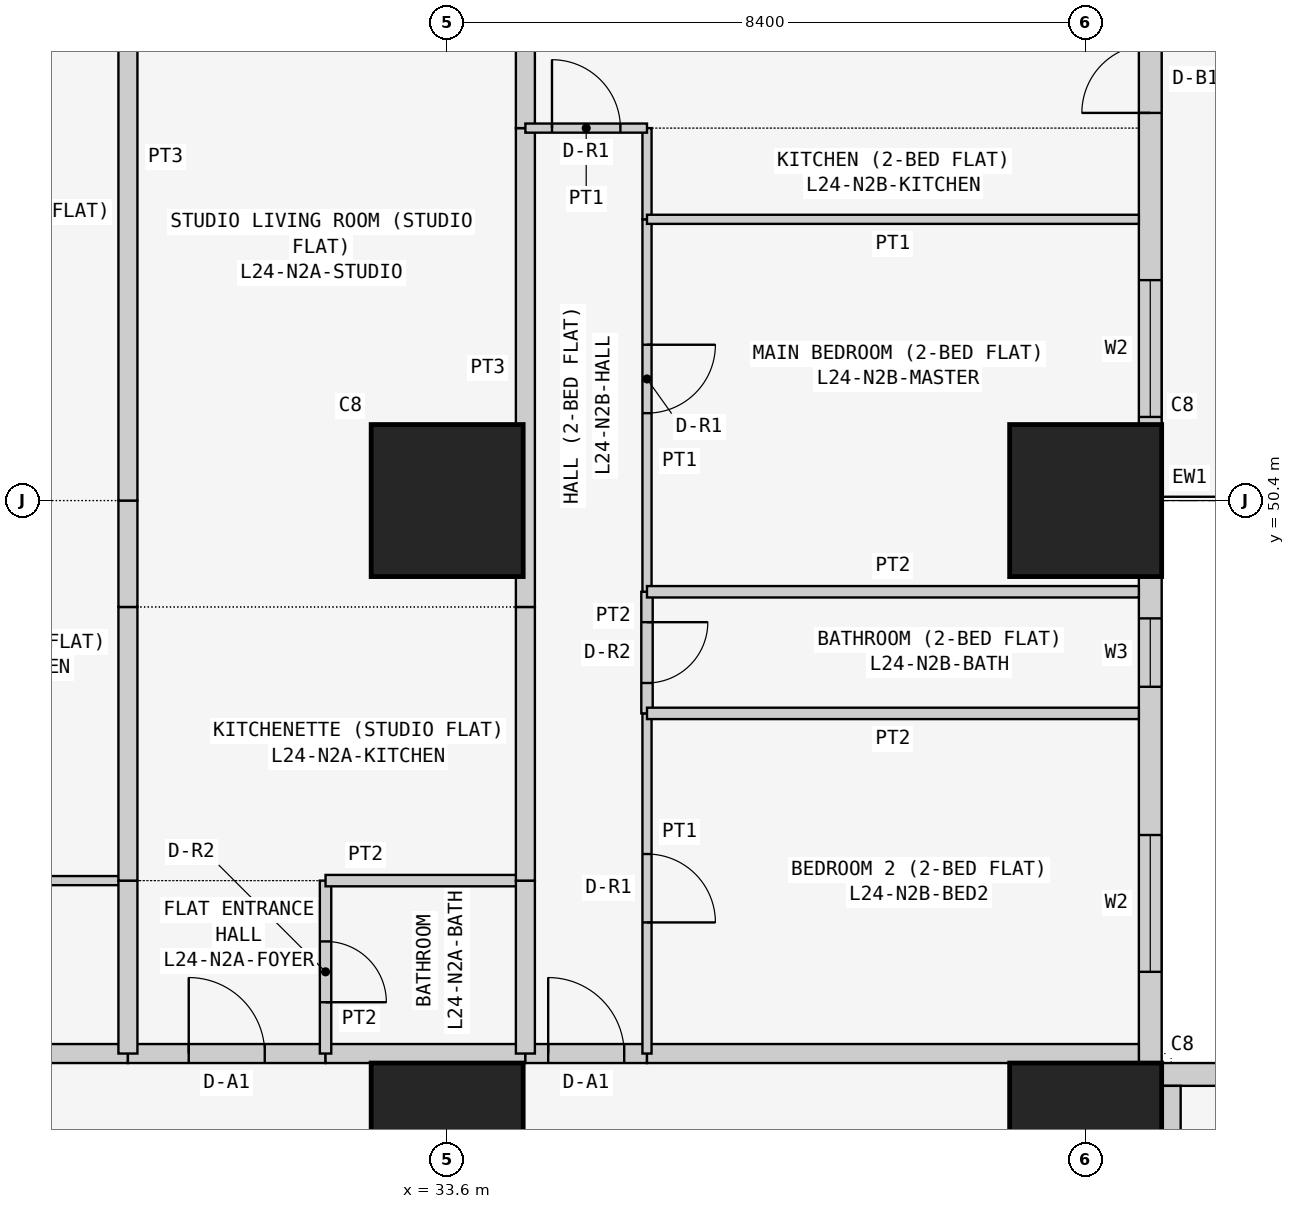
"""IFC4 building model, lengths in metres.
Left out: names, types, materials, properties, quantities, classifications, styles, units other than length and angle.
Written with IfcOpenShell. Run it as: python <this file> out.ifc"""

import sys

from ifc_helpers import new_model, si_unit, direction, frame, frame_2d, origin, origin_2d, place, context, subcontext, project, spatial, rectangle, extrude, element, fill, save


model = new_model("IFC4")
c1 = context("Model", 3, precision=1e-05, world=origin(), true_north=direction((0.0, 1.0)))
c2 = subcontext(c1, "Body", "Model", "MODEL_VIEW")
j1 = project(units=[si_unit("LENGTHUNIT", "METRE"), si_unit("PLANEANGLEUNIT", "RADIAN")], contexts=[c1])
p1 = place(None, origin())
s1 = spatial("IfcSite", under=j1, at=p1, CompositionType="ELEMENT")
p2 = place(p1, origin())
s2 = spatial("IfcBuilding", under=s1, at=p2, CompositionType="ELEMENT")
p3 = place(p2, frame((0.0, 0.0, 95.7)))
s3 = spatial("IfcBuildingStorey", under=s2, at=p3, CompositionType="ELEMENT", Elevation=95.7)
for number, where, z_axis, x_axis in (
    (1, (33.6, 42.0, 0.0), (0.0, 0.0, 1.0), (1.0, 0.0, 0.0)),
    (2, (33.6, 50.4, 0.0), (0.0, 0.0, 1.0), (1.0, 0.0, 0.0)),
    (3, (42.0, 42.0, 0.0), (0.0, 0.0, 1.0), (1.0, 0.0, 0.0)),
    (4, (42.0, 50.4, 0.0), (0.0, 0.0, 1.0), (1.0, 0.0, 0.0)),
):
    element("IfcColumn", number, at=place(p3, frame(where, z_axis=z_axis, x_axis=x_axis)), inside=s3, PredefinedType="COLUMN", context=c2, shape_type="SweptSolid", body=[
        extrude(rectangle(XDim=2.0, YDim=2.0, at=origin_2d()), origin(), (0.0, 0.0, 1.0), 3.6),
    ])
p4 = place(p3, frame((58.4, 42.85, 0.0), z_axis=(0.0, 0.0, 1.0), x_axis=(-1.0, 0.0, 0.0)))
e5 = element("IfcWall", 5, at=p4, inside=s3, PredefinedType="SOLIDWALL", context=c2, shape_type="SweptSolid", body=[
    extrude(rectangle(XDim=15.7, YDim=0.3, at=frame_2d((7.85, 0.0))), origin(), (0.0, 0.0, 1.0), 3.45),
])
p5 = place(p4, frame((12.4, 0.0, 0.9)))
e6 = element("IfcOpeningElement", 6, at=p5, cuts=e5, PredefinedType="OPENING", context=c2, shape_type="SweptSolid", body=[
    extrude(rectangle(XDim=1.8, YDim=1.5, at=frame_2d((0.9, 0.75))), frame((0.0, 0.16, 0.0), z_axis=(0.0, -1.0, 0.0), x_axis=(1.0, 0.0, 0.0)), (0.0, 0.0, 1.0), 0.32),
])
p6 = place(p4, frame((9.55, 0.0, 1.5)))
e7 = element("IfcOpeningElement", 7, at=p6, cuts=e5, PredefinedType="OPENING", context=c2, shape_type="SweptSolid", body=[
    extrude(rectangle(XDim=0.9, YDim=0.7, at=frame_2d((0.45, 0.35))), frame((0.0, 0.16, 0.0), z_axis=(0.0, -1.0, 0.0), x_axis=(1.0, 0.0, 0.0)), (0.0, 0.0, 1.0), 0.32),
])
p7 = place(p4, frame((5.1, 0.0, 0.9)))
e8 = element("IfcOpeningElement", 8, at=p7, cuts=e5, PredefinedType="OPENING", context=c2, shape_type="SweptSolid", body=[
    extrude(rectangle(XDim=1.8, YDim=1.5, at=frame_2d((0.9, 0.75))), frame((0.0, 0.16, 0.0), z_axis=(0.0, -1.0, 0.0), x_axis=(1.0, 0.0, 0.0)), (0.0, 0.0, 1.0), 0.32),
])
p8 = place(p4, frame((2.0, 0.0, 0.0)))
e9 = element("IfcOpeningElement", 9, at=p8, cuts=e5, PredefinedType="OPENING", context=c2, shape_type="SweptSolid", body=[
    extrude(rectangle(XDim=0.9, YDim=2.4, at=frame_2d((0.45, 1.2))), frame((0.0, 0.16, 0.0), z_axis=(0.0, -1.0, 0.0), x_axis=(1.0, 0.0, 0.0)), (0.0, 0.0, 1.0), 0.32),
])
p9 = place(p4, frame((0.7, 0.0, 0.9)))
e10 = element("IfcOpeningElement", 10, at=p9, cuts=e5, PredefinedType="OPENING", context=c2, shape_type="SweptSolid", body=[
    extrude(rectangle(XDim=1.2, YDim=1.5, at=frame_2d((0.6, 0.75))), frame((0.0, 0.16, 0.0), z_axis=(0.0, -1.0, 0.0), x_axis=(1.0, 0.0, 0.0)), (0.0, 0.0, 1.0), 0.32),
])
p10 = place(p3, frame((42.85, 43.0, 0.0), z_axis=(0.0, 0.0, 1.0), x_axis=(0.0, 1.0, 0.0)))
e11 = element("IfcWall", 11, at=p10, inside=s3, PredefinedType="SOLIDWALL", context=c2, shape_type="SweptSolid", body=[
    extrude(rectangle(XDim=15.4, YDim=0.3, at=frame_2d((7.7, 0.0))), origin(), (0.0, 0.0, 1.0), 3.45),
])
p11 = place(p10, frame((1.2, 0.0, 0.9)))
e12 = element("IfcOpeningElement", 12, at=p11, cuts=e11, PredefinedType="OPENING", context=c2, shape_type="SweptSolid", body=[
    extrude(rectangle(XDim=1.8, YDim=1.5, at=frame_2d((0.9, 0.75))), frame((0.0, 0.16, 0.0), z_axis=(0.0, -1.0, 0.0), x_axis=(1.0, 0.0, 0.0)), (0.0, 0.0, 1.0), 0.32),
])
p12 = place(p10, frame((4.95, 0.0, 1.5)))
e13 = element("IfcOpeningElement", 13, at=p12, cuts=e11, PredefinedType="OPENING", context=c2, shape_type="SweptSolid", body=[
    extrude(rectangle(XDim=0.9, YDim=0.7, at=frame_2d((0.45, 0.35))), frame((0.0, 0.16, 0.0), z_axis=(0.0, -1.0, 0.0), x_axis=(1.0, 0.0, 0.0)), (0.0, 0.0, 1.0), 0.32),
])
p13 = place(p10, frame((8.5, 0.0, 0.9)))
e14 = element("IfcOpeningElement", 14, at=p13, cuts=e11, PredefinedType="OPENING", context=c2, shape_type="SweptSolid", body=[
    extrude(rectangle(XDim=1.8, YDim=1.5, at=frame_2d((0.9, 0.75))), frame((0.0, 0.16, 0.0), z_axis=(0.0, -1.0, 0.0), x_axis=(1.0, 0.0, 0.0)), (0.0, 0.0, 1.0), 0.32),
])
p14 = place(p10, frame((12.5, 0.0, 0.0)))
e15 = element("IfcOpeningElement", 15, at=p14, cuts=e11, PredefinedType="OPENING", context=c2, shape_type="SweptSolid", body=[
    extrude(rectangle(XDim=0.9, YDim=2.4, at=frame_2d((0.45, 1.2))), frame((0.0, 0.16, 0.0), z_axis=(0.0, -1.0, 0.0), x_axis=(1.0, 0.0, 0.0)), (0.0, 0.0, 1.0), 0.32),
])
p15 = place(p10, frame((13.5, 0.0, 0.9)))
e16 = element("IfcOpeningElement", 16, at=p15, cuts=e11, PredefinedType="OPENING", context=c2, shape_type="SweptSolid", body=[
    extrude(rectangle(XDim=1.2, YDim=1.5, at=frame_2d((0.6, 0.75))), frame((0.0, 0.16, 0.0), z_axis=(0.0, -1.0, 0.0), x_axis=(1.0, 0.0, 0.0)), (0.0, 0.0, 1.0), 0.32),
])
p16 = place(p3, frame((22.3, 43.125, 0.0), z_axis=(0.0, 0.0, 1.0), x_axis=(1.0, 0.0, 0.0)))
e17 = element("IfcWall", 17, at=p16, inside=s3, PredefinedType="PARTITIONING", context=c2, shape_type="SweptSolid", body=[
    extrude(rectangle(XDim=7.1, YDim=0.25, at=frame_2d((3.55, 0.0))), origin(), (0.0, 0.0, 1.0), 3.45),
])
p17 = place(p16, frame((4.05, 0.0, 0.0)))
e18 = element("IfcOpeningElement", 18, at=p17, cuts=e17, PredefinedType="OPENING", context=c2, shape_type="SweptSolid", body=[
    extrude(rectangle(XDim=1.0, YDim=2.1, at=frame_2d((0.5, 1.05))), frame((0.0, 0.135, 0.0), z_axis=(0.0, -1.0, 0.0), x_axis=(1.0, 0.0, 0.0)), (0.0, 0.0, 1.0), 0.27),
])
p18 = place(p3, frame((29.4, 43.125, 0.0), z_axis=(0.0, 0.0, 1.0), x_axis=(1.0, 0.0, 0.0)))
e19 = element("IfcWall", 19, at=p18, inside=s3, PredefinedType="PARTITIONING", context=c2, shape_type="SweptSolid", body=[
    extrude(rectangle(XDim=2.6, YDim=0.25, at=frame_2d((1.3, 0.0))), origin(), (0.0, 0.0, 1.0), 3.45),
])
p19 = place(p18, frame((0.8, 0.0, 0.0)))
e20 = element("IfcOpeningElement", 20, at=p19, cuts=e19, PredefinedType="OPENING", context=c2, shape_type="SweptSolid", body=[
    extrude(rectangle(XDim=1.0, YDim=2.1, at=frame_2d((0.5, 1.05))), frame((0.0, 0.135, 0.0), z_axis=(0.0, -1.0, 0.0), x_axis=(1.0, 0.0, 0.0)), (0.0, 0.0, 1.0), 0.27),
])
p20 = place(p3, frame((32.0, 43.125, 0.0), z_axis=(0.0, 0.0, 1.0), x_axis=(1.0, 0.0, 0.0)))
e21 = element("IfcWall", 21, at=p20, inside=s3, PredefinedType="PARTITIONING", context=c2, shape_type="SweptSolid", body=[
    extrude(rectangle(XDim=2.629, YDim=0.25, at=frame_2d((1.314, 0.0))), origin(), (0.0, 0.0, 1.0), 3.45),
])
p21 = place(p3, frame((34.629, 43.125, 0.0), z_axis=(0.0, 0.0, 1.0), x_axis=(1.0, 0.0, 0.0)))
e22 = element("IfcWall", 22, at=p21, inside=s3, PredefinedType="PARTITIONING", context=c2, shape_type="SweptSolid", body=[
    extrude(rectangle(XDim=1.6, YDim=0.25, at=frame_2d((0.8, 0.0))), origin(), (0.0, 0.0, 1.0), 3.45),
])
p22 = place(p21, frame((0.3, 0.0, 0.0)))
e23 = element("IfcOpeningElement", 23, at=p22, cuts=e22, PredefinedType="OPENING", context=c2, shape_type="SweptSolid", body=[
    extrude(rectangle(XDim=1.0, YDim=2.1, at=frame_2d((0.5, 1.05))), frame((0.0, 0.135, 0.0), z_axis=(0.0, -1.0, 0.0), x_axis=(1.0, 0.0, 0.0)), (0.0, 0.0, 1.0), 0.27),
])
p23 = place(p3, frame((36.229, 43.125, 0.0), z_axis=(0.0, 0.0, 1.0), x_axis=(1.0, 0.0, 0.0)))
e24 = element("IfcWall", 24, at=p23, inside=s3, PredefinedType="PARTITIONING", context=c2, shape_type="SweptSolid", body=[
    extrude(rectangle(XDim=6.471, YDim=0.25, at=frame_2d((3.235, 0.0))), origin(), (0.0, 0.0, 1.0), 3.45),
])
p24 = place(p3, frame((43.125, 42.7, 0.0), z_axis=(0.0, 0.0, 1.0), x_axis=(0.0, -1.0, 0.0)))
e25 = element("IfcWall", 25, at=p24, inside=s3, PredefinedType="PARTITIONING", context=c2, shape_type="SweptSolid", body=[
    extrude(rectangle(XDim=6.871, YDim=0.25, at=frame_2d((3.436, 0.0))), origin(), (0.0, 0.0, 1.0), 3.45),
])
p25 = place(p3, frame((29.4, 45.4, 0.0), z_axis=(0.0, 0.0, 1.0), x_axis=(-1.0, 0.0, 0.0)))
e26 = element("IfcWall", 26, at=p25, inside=s3, PredefinedType="PARTITIONING", context=c2, shape_type="SweptSolid", body=[
    extrude(rectangle(XDim=4.0, YDim=0.12, at=frame_2d((2.0, 0.0))), origin(), (0.0, 0.0, 1.0), 3.45),
])
p26 = place(p25, frame((1.05, 0.0, 0.0)))
e27 = element("IfcOpeningElement", 27, at=p26, cuts=e26, PredefinedType="OPENING", context=c2, shape_type="SweptSolid", body=[
    extrude(rectangle(XDim=0.9, YDim=2.1, at=frame_2d((0.45, 1.05))), frame((0.0, 0.07, 0.0), z_axis=(0.0, -1.0, 0.0), x_axis=(1.0, 0.0, 0.0)), (0.0, 0.0, 1.0), 0.14),
])
p27 = place(p3, frame((29.4, 43.125, 0.0), z_axis=(0.0, 0.0, 1.0), x_axis=(0.0, 1.0, 0.0)))
e28 = element("IfcWall", 28, at=p27, inside=s3, PredefinedType="PARTITIONING", context=c2, shape_type="SweptSolid", body=[
    extrude(rectangle(XDim=2.275, YDim=0.25, at=frame_2d((1.137, 0.0))), origin(), (0.0, 0.0, 1.0), 2.848),
])
p28 = place(p3, frame((29.4, 49.0, 0.0), z_axis=(0.0, 0.0, 1.0), x_axis=(0.0, -1.0, 0.0)))
e29 = element("IfcWall", 29, at=p28, inside=s3, PredefinedType="PARTITIONING", context=c2, shape_type="SweptSolid", body=[
    extrude(rectangle(XDim=3.6, YDim=0.25, at=frame_2d((1.8, 0.0))), origin(), (0.0, 0.0, 1.0), 2.848),
])
p29 = place(p3, frame((29.4, 50.4, 0.0), z_axis=(0.0, 0.0, 1.0), x_axis=(0.0, -1.0, 0.0)))
e30 = element("IfcWall", 30, at=p29, inside=s3, PredefinedType="PARTITIONING", context=c2, shape_type="SweptSolid", body=[
    extrude(rectangle(XDim=1.4, YDim=0.25, at=frame_2d((0.7, 0.0))), origin(), (0.0, 0.0, 1.0), 2.848),
])
p30 = place(p3, frame((29.4, 59.45, 0.0), z_axis=(0.0, 0.0, 1.0), x_axis=(0.0, -1.0, 0.0)))
e31 = element("IfcWall", 31, at=p30, inside=s3, PredefinedType="PARTITIONING", context=c2, shape_type="SweptSolid", body=[
    extrude(rectangle(XDim=9.05, YDim=0.25, at=frame_2d((4.525, 0.0))), origin(), (0.0, 0.0, 1.0), 2.848),
])
p31 = place(p3, frame((32.0, 45.4, 0.0), z_axis=(0.0, 0.0, 1.0), x_axis=(0.0, -1.0, 0.0)))
e32 = element("IfcWall", 32, at=p31, inside=s3, PredefinedType="PARTITIONING", context=c2, shape_type="SweptSolid", body=[
    extrude(rectangle(XDim=2.275, YDim=0.15, at=frame_2d((1.137, 0.0))), origin(), (0.0, 0.0, 1.0), 3.45),
])
p32 = place(p31, frame((0.8, 0.0, 0.0)))
e33 = element("IfcOpeningElement", 33, at=p32, cuts=e32, PredefinedType="OPENING", context=c2, shape_type="SweptSolid", body=[
    extrude(rectangle(XDim=0.8, YDim=2.1, at=frame_2d((0.4, 1.05))), frame((0.0, 0.085, 0.0), z_axis=(0.0, -1.0, 0.0), x_axis=(1.0, 0.0, 0.0)), (0.0, 0.0, 1.0), 0.17),
])
p33 = place(p3, frame((32.0, 45.4, 0.0), z_axis=(0.0, 0.0, 1.0), x_axis=(1.0, 0.0, 0.0)))
e34 = element("IfcWall", 34, at=p33, inside=s3, PredefinedType="PARTITIONING", context=c2, shape_type="SweptSolid", body=[
    extrude(rectangle(XDim=2.629, YDim=0.15, at=frame_2d((1.314, 0.0))), origin(), (0.0, 0.0, 1.0), 3.45),
])
p34 = place(p3, frame((34.629, 45.4, 0.0), z_axis=(0.0, 0.0, 1.0), x_axis=(0.0, -1.0, 0.0)))
e35 = element("IfcWall", 35, at=p34, inside=s3, PredefinedType="PARTITIONING", context=c2, shape_type="SweptSolid", body=[
    extrude(rectangle(XDim=2.275, YDim=0.25, at=frame_2d((1.137, 0.0))), origin(), (0.0, 0.0, 1.0), 3.45),
])
p35 = place(p3, frame((34.629, 49.0, 0.0), z_axis=(0.0, 0.0, 1.0), x_axis=(0.0, -1.0, 0.0)))
e36 = element("IfcWall", 36, at=p35, inside=s3, PredefinedType="PARTITIONING", context=c2, shape_type="SweptSolid", body=[
    extrude(rectangle(XDim=3.6, YDim=0.25, at=frame_2d((1.8, 0.0))), origin(), (0.0, 0.0, 1.0), 3.45),
])
p36 = place(p3, frame((34.629, 55.3, 0.0), z_axis=(0.0, 0.0, 1.0), x_axis=(0.0, -1.0, 0.0)))
e37 = element("IfcWall", 37, at=p36, inside=s3, PredefinedType="PARTITIONING", context=c2, shape_type="SweptSolid", body=[
    extrude(rectangle(XDim=6.3, YDim=0.25, at=frame_2d((3.15, 0.0))), origin(), (0.0, 0.0, 1.0), 3.45),
])
p37 = place(p3, frame((34.629, 59.45, 0.0), z_axis=(0.0, 0.0, 1.0), x_axis=(0.0, -1.0, 0.0)))
e38 = element("IfcWall", 38, at=p37, inside=s3, PredefinedType="PARTITIONING", context=c2, shape_type="SweptSolid", body=[
    extrude(rectangle(XDim=4.15, YDim=0.25, at=frame_2d((2.075, 0.0))), origin(), (0.0, 0.0, 1.0), 3.45),
])
p38 = place(p3, frame((36.229, 47.6, 0.0), z_axis=(0.0, 0.0, 1.0), x_axis=(0.0, -1.0, 0.0)))
e39 = element("IfcWall", 39, at=p38, inside=s3, PredefinedType="PARTITIONING", context=c2, shape_type="SweptSolid", body=[
    extrude(rectangle(XDim=4.475, YDim=0.12, at=frame_2d((2.238, 0.0))), origin(), (0.0, 0.0, 1.0), 3.45),
])
p39 = place(p38, frame((1.85, 0.0, 0.0)))
e40 = element("IfcOpeningElement", 40, at=p39, cuts=e39, PredefinedType="OPENING", context=c2, shape_type="SweptSolid", body=[
    extrude(rectangle(XDim=0.9, YDim=2.1, at=frame_2d((0.45, 1.05))), frame((0.0, 0.07, 0.0), z_axis=(0.0, -1.0, 0.0), x_axis=(1.0, 0.0, 0.0)), (0.0, 0.0, 1.0), 0.14),
])
p40 = place(p3, frame((36.229, 49.2, 0.0), z_axis=(0.0, 0.0, 1.0), x_axis=(0.0, -1.0, 0.0)))
e41 = element("IfcWall", 41, at=p40, inside=s3, PredefinedType="PARTITIONING", context=c2, shape_type="SweptSolid", body=[
    extrude(rectangle(XDim=1.6, YDim=0.15, at=frame_2d((0.8, 0.0))), origin(), (0.0, 0.0, 1.0), 3.45),
])
p41 = place(p40, frame((0.4, 0.0, 0.0)))
e42 = element("IfcOpeningElement", 42, at=p41, cuts=e41, PredefinedType="OPENING", context=c2, shape_type="SweptSolid", body=[
    extrude(rectangle(XDim=0.8, YDim=2.1, at=frame_2d((0.4, 1.05))), frame((0.0, 0.085, 0.0), z_axis=(0.0, -1.0, 0.0), x_axis=(1.0, 0.0, 0.0)), (0.0, 0.0, 1.0), 0.17),
])
p42 = place(p3, frame((36.229, 54.1, 0.0), z_axis=(0.0, 0.0, 1.0), x_axis=(0.0, -1.0, 0.0)))
e43 = element("IfcWall", 43, at=p42, inside=s3, PredefinedType="PARTITIONING", context=c2, shape_type="SweptSolid", body=[
    extrude(rectangle(XDim=4.9, YDim=0.12, at=frame_2d((2.45, 0.0))), origin(), (0.0, 0.0, 1.0), 3.45),
])
p43 = place(p42, frame((1.65, 0.0, 0.0)))
e44 = element("IfcOpeningElement", 44, at=p43, cuts=e43, PredefinedType="OPENING", context=c2, shape_type="SweptSolid", body=[
    extrude(rectangle(XDim=0.9, YDim=2.1, at=frame_2d((0.45, 1.05))), frame((0.0, 0.07, 0.0), z_axis=(0.0, -1.0, 0.0), x_axis=(1.0, 0.0, 0.0)), (0.0, 0.0, 1.0), 0.14),
])
p44 = place(p3, frame((36.229, 55.3, 0.0), z_axis=(0.0, 0.0, 1.0), x_axis=(0.0, -1.0, 0.0)))
e45 = element("IfcWall", 45, at=p44, inside=s3, PredefinedType="PARTITIONING", context=c2, shape_type="SweptSolid", body=[
    extrude(rectangle(XDim=1.2, YDim=0.12, at=frame_2d((0.6, 0.0))), origin(), (0.0, 0.0, 1.0), 3.45),
])
p45 = place(p3, frame((34.629, 55.3, 0.0), z_axis=(0.0, 0.0, 1.0), x_axis=(1.0, 0.0, 0.0)))
e46 = element("IfcWall", 46, at=p45, inside=s3, PredefinedType="PARTITIONING", context=c2, shape_type="SweptSolid", body=[
    extrude(rectangle(XDim=1.6, YDim=0.12, at=frame_2d((0.8, 0.0))), origin(), (0.0, 0.0, 1.0), 3.45),
])
p46 = place(p45, frame((0.35, 0.0, 0.0)))
e47 = element("IfcOpeningElement", 47, at=p46, cuts=e46, PredefinedType="OPENING", context=c2, shape_type="SweptSolid", body=[
    extrude(rectangle(XDim=0.9, YDim=2.1, at=frame_2d((0.45, 1.05))), frame((0.0, 0.07, 0.0), z_axis=(0.0, -1.0, 0.0), x_axis=(1.0, 0.0, 0.0)), (0.0, 0.0, 1.0), 0.14),
])
for number, where, z_axis, x_axis in (
    (48, (36.229, 47.6, 0.0), (0.0, 0.0, 1.0), (1.0, 0.0, 0.0)),
    (49, (36.229, 49.2, 0.0), (0.0, 0.0, 1.0), (1.0, 0.0, 0.0)),
):
    element("IfcWall", number, at=place(p3, frame(where, z_axis=z_axis, x_axis=x_axis)), inside=s3, PredefinedType="PARTITIONING", context=c2, shape_type="SweptSolid", body=[
        extrude(rectangle(XDim=6.471, YDim=0.15, at=frame_2d((3.235, 0.0))), origin(), (0.0, 0.0, 1.0), 3.45),
    ])
p47 = place(p3, frame((36.229, 54.1, 0.0), z_axis=(0.0, 0.0, 1.0), x_axis=(1.0, 0.0, 0.0)))
e50 = element("IfcWall", 50, at=p47, inside=s3, PredefinedType="PARTITIONING", context=c2, shape_type="SweptSolid", body=[
    extrude(rectangle(XDim=6.471, YDim=0.12, at=frame_2d((3.235, 0.0))), origin(), (0.0, 0.0, 1.0), 3.45),
])
p48 = place(p11, origin())
e51 = element("IfcWindow", 51, at=p48, inside=s3, PartitioningType="SINGLE_PANEL", PredefinedType="WINDOW", context=c2, shape_type="SweptSolid", body=[
    extrude(rectangle(XDim=1.8, YDim=1.5, at=frame_2d((0.9, 0.75))), frame((0.0, 0.03, 0.0), z_axis=(0.0, -1.0, 0.0), x_axis=(1.0, 0.0, 0.0)), (0.0, 0.0, 1.0), 0.06),
])
fill(e12, e51)
p49 = place(p12, origin())
e52 = element("IfcWindow", 52, at=p49, inside=s3, PartitioningType="SINGLE_PANEL", PredefinedType="WINDOW", context=c2, shape_type="SweptSolid", body=[
    extrude(rectangle(XDim=0.9, YDim=0.7, at=frame_2d((0.45, 0.35))), frame((0.0, 0.03, 0.0), z_axis=(0.0, -1.0, 0.0), x_axis=(1.0, 0.0, 0.0)), (0.0, 0.0, 1.0), 0.06),
])
fill(e13, e52)
p50 = place(p13, origin())
e53 = element("IfcWindow", 53, at=p50, inside=s3, PartitioningType="SINGLE_PANEL", PredefinedType="WINDOW", context=c2, shape_type="SweptSolid", body=[
    extrude(rectangle(XDim=1.8, YDim=1.5, at=frame_2d((0.9, 0.75))), frame((0.0, 0.03, 0.0), z_axis=(0.0, -1.0, 0.0), x_axis=(1.0, 0.0, 0.0)), (0.0, 0.0, 1.0), 0.06),
])
fill(e14, e53)
p51 = place(p14, origin())
e54 = element("IfcDoor", 54, at=p51, inside=s3, OperationType="SINGLE_SWING_LEFT", PredefinedType="DOOR", context=c2, shape_type="SweptSolid", body=[
    extrude(rectangle(XDim=0.9, YDim=2.4, at=frame_2d((0.45, 1.2))), frame((0.0, 0.025, 0.0), z_axis=(0.0, -1.0, 0.0), x_axis=(1.0, 0.0, 0.0)), (0.0, 0.0, 1.0), 0.05),
])
fill(e15, e54)
p52 = place(p19, origin())
e55 = element("IfcDoor", 55, at=p52, inside=s3, OperationType="SINGLE_SWING_LEFT", PredefinedType="DOOR", context=c2, shape_type="SweptSolid", body=[
    extrude(rectangle(XDim=1.0, YDim=2.1, at=frame_2d((0.5, 1.05))), frame((0.0, 0.025, 0.0), z_axis=(0.0, -1.0, 0.0), x_axis=(1.0, 0.0, 0.0)), (0.0, 0.0, 1.0), 0.05),
])
fill(e20, e55)
p53 = place(p32, origin())
e56 = element("IfcDoor", 56, at=p53, inside=s3, OperationType="SINGLE_SWING_RIGHT", PredefinedType="DOOR", context=c2, shape_type="SweptSolid", body=[
    extrude(rectangle(XDim=0.8, YDim=2.1, at=frame_2d((0.4, 1.05))), frame((0.0, 0.025, 0.0), z_axis=(0.0, -1.0, 0.0), x_axis=(1.0, 0.0, 0.0)), (0.0, 0.0, 1.0), 0.05),
])
fill(e33, e56)
p54 = place(p22, origin())
e57 = element("IfcDoor", 57, at=p54, inside=s3, OperationType="SINGLE_SWING_LEFT", PredefinedType="DOOR", context=c2, shape_type="SweptSolid", body=[
    extrude(rectangle(XDim=1.0, YDim=2.1, at=frame_2d((0.5, 1.05))), frame((0.0, 0.025, 0.0), z_axis=(0.0, -1.0, 0.0), x_axis=(1.0, 0.0, 0.0)), (0.0, 0.0, 1.0), 0.05),
])
fill(e23, e57)
p55 = place(p39, origin())
e58 = element("IfcDoor", 58, at=p55, inside=s3, OperationType="SINGLE_SWING_RIGHT", PredefinedType="DOOR", context=c2, shape_type="SweptSolid", body=[
    extrude(rectangle(XDim=0.9, YDim=2.1, at=frame_2d((0.45, 1.05))), frame((0.0, 0.025, 0.0), z_axis=(0.0, -1.0, 0.0), x_axis=(1.0, 0.0, 0.0)), (0.0, 0.0, 1.0), 0.05),
])
fill(e40, e58)
p56 = place(p41, origin())
e59 = element("IfcDoor", 59, at=p56, inside=s3, OperationType="SINGLE_SWING_LEFT", PredefinedType="DOOR", context=c2, shape_type="SweptSolid", body=[
    extrude(rectangle(XDim=0.8, YDim=2.1, at=frame_2d((0.4, 1.05))), frame((0.0, 0.025, 0.0), z_axis=(0.0, -1.0, 0.0), x_axis=(1.0, 0.0, 0.0)), (0.0, 0.0, 1.0), 0.05),
])
fill(e42, e59)
p57 = place(p43, origin())
e60 = element("IfcDoor", 60, at=p57, inside=s3, OperationType="SINGLE_SWING_LEFT", PredefinedType="DOOR", context=c2, shape_type="SweptSolid", body=[
    extrude(rectangle(XDim=0.9, YDim=2.1, at=frame_2d((0.45, 1.05))), frame((0.0, 0.025, 0.0), z_axis=(0.0, -1.0, 0.0), x_axis=(1.0, 0.0, 0.0)), (0.0, 0.0, 1.0), 0.05),
])
fill(e44, e60)
p58 = place(p46, origin())
e61 = element("IfcDoor", 61, at=p58, inside=s3, OperationType="SINGLE_SWING_LEFT", PredefinedType="DOOR", context=c2, shape_type="SweptSolid", body=[
    extrude(rectangle(XDim=0.9, YDim=2.1, at=frame_2d((0.45, 1.05))), frame((0.0, 0.025, 0.0), z_axis=(0.0, -1.0, 0.0), x_axis=(1.0, 0.0, 0.0)), (0.0, 0.0, 1.0), 0.05),
])
fill(e47, e61)
save(model, sys.argv[1])
